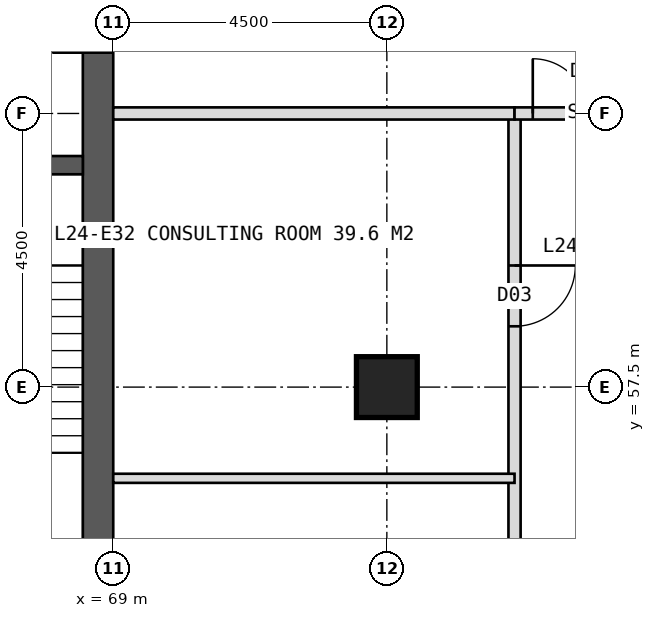
"""IFC4 building model, lengths in metres.
Left out: names, types, materials, properties, quantities, classifications, styles, units other than length and angle.
Written with IfcOpenShell. Run it as: python <this file> out.ifc"""

import sys

from ifc_helpers import new_model, si_unit, direction, frame, frame_2d, origin, origin_2d, place, context, subcontext, project, spatial, rectangle, hollow_rectangle, extrude, element, fill, save


model = new_model("IFC4")
c1 = context("Model", 3, precision=1e-05, world=origin(), true_north=direction((0.0, 1.0)))
c2 = subcontext(c1, "Body", "Model", "MODEL_VIEW")
j1 = project(units=[si_unit("LENGTHUNIT", "METRE"), si_unit("PLANEANGLEUNIT", "RADIAN")], contexts=[c1])
p1 = place(None, origin())
s1 = spatial("IfcSite", under=j1, at=p1, CompositionType="ELEMENT")
p2 = place(p1, origin())
s2 = spatial("IfcBuilding", under=s1, at=p2, CompositionType="ELEMENT")
p3 = place(p2, frame((0.0, 0.0, 104.0)))
s3 = spatial("IfcBuildingStorey", under=s2, at=p3, CompositionType="ELEMENT", Elevation=104.0)
p4 = place(p3, frame((68.75, 53.5, 0.0), z_axis=(0.0, 0.0, 1.0), x_axis=(0.0, 1.0, 0.0)))
e1 = element("IfcWall", 1, at=p4, inside=s3, PredefinedType="SHEAR", context=c2, shape_type="SweptSolid", body=[
    extrude(rectangle(XDim=17.0, YDim=0.5, at=frame_2d((8.5, 0.0))), origin(), (0.0, 0.0, 1.0), 4.0),
])
p5 = place(p4, frame((9.5, 0.0, 0.0)))
e2 = element("IfcOpeningElement", 2, at=p5, cuts=e1, PredefinedType="OPENING", context=c2, shape_type="SweptSolid", body=[
    extrude(rectangle(XDim=1.5, YDim=2.2, at=frame_2d((0.75, 1.1))), frame((0.0, 0.26, 0.0), z_axis=(0.0, -1.0, 0.0), x_axis=(1.0, 0.0, 0.0)), (0.0, 0.0, 1.0), 0.52),
])
p6 = place(p3, frame((65.2, 61.15, 0.0), z_axis=(0.0, 0.0, 1.0), x_axis=(1.0, 0.0, 0.0)))
e3 = element("IfcWall", 3, at=p6, inside=s3, PredefinedType="SHEAR", context=c2, shape_type="SweptSolid", body=[
    extrude(rectangle(XDim=3.3, YDim=0.3, at=frame_2d((1.65, 0.0))), origin(), (0.0, 0.0, 1.0), 4.0),
])
p7 = place(p6, frame((1.05, 0.0, 0.0)))
e4 = element("IfcOpeningElement", 4, at=p7, cuts=e3, PredefinedType="OPENING", context=c2, shape_type="SweptSolid", body=[
    extrude(rectangle(XDim=1.2, YDim=2.1, at=frame_2d((0.6, 1.05))), frame((0.0, 0.16, 0.0), z_axis=(0.0, -1.0, 0.0), x_axis=(1.0, 0.0, 0.0)), (0.0, 0.0, 1.0), 0.32),
])
p8 = place(p3, frame((73.5, 57.5, 0.0), z_axis=(0.0, 0.0, 1.0), x_axis=(1.0, 0.0, 0.0)))
e5 = element("IfcColumn", 5, at=p8, inside=s3, PredefinedType="COLUMN", context=c2, shape_type="SweptSolid", body=[
    extrude(hollow_rectangle(XDim=1.0, YDim=1.0, WallThickness=0.1, at=origin_2d()), origin(), (0.0, 0.0, 1.0), 4.0),
])
p9 = place(p3, frame((75.6, 62.0, 0.0), z_axis=(0.0, 0.0, 1.0), x_axis=(0.0, -1.0, 0.0)))
e6 = element("IfcWall", 6, at=p9, inside=s3, PredefinedType="PARTITIONING", context=c2, shape_type="SweptSolid", body=[
    extrude(rectangle(XDim=15.6, YDim=0.2, at=frame_2d((7.8, 0.0))), origin(), (0.0, 0.0, 1.0), 3.75),
])
p10 = place(p9, frame((2.5, 0.0, 0.0)))
e7 = element("IfcOpeningElement", 7, at=p10, cuts=e6, PredefinedType="OPENING", context=c2, shape_type="SweptSolid", body=[
    extrude(rectangle(XDim=1.0, YDim=2.1, at=frame_2d((0.5, 1.05))), frame((0.0, 0.11, 0.0), z_axis=(0.0, -1.0, 0.0), x_axis=(1.0, 0.0, 0.0)), (0.0, 0.0, 1.0), 0.22),
])
p11 = place(p9, frame((7.75, 0.0, 0.0)))
e8 = element("IfcOpeningElement", 8, at=p11, cuts=e6, PredefinedType="OPENING", context=c2, shape_type="SweptSolid", body=[
    extrude(rectangle(XDim=1.0, YDim=2.1, at=frame_2d((0.5, 1.05))), frame((0.0, 0.11, 0.0), z_axis=(0.0, -1.0, 0.0), x_axis=(1.0, 0.0, 0.0)), (0.0, 0.0, 1.0), 0.22),
])
p12 = place(p9, frame((12.55, 0.0, 0.0)))
e9 = element("IfcOpeningElement", 9, at=p12, cuts=e6, PredefinedType="OPENING", context=c2, shape_type="SweptSolid", body=[
    extrude(rectangle(XDim=1.0, YDim=2.1, at=frame_2d((0.5, 1.05))), frame((0.0, 0.11, 0.0), z_axis=(0.0, -1.0, 0.0), x_axis=(1.0, 0.0, 0.0)), (0.0, 0.0, 1.0), 0.22),
])
p13 = place(p3, frame((69.0, 62.0, 0.0), z_axis=(0.0, 0.0, 1.0), x_axis=(1.0, 0.0, 0.0)))
e10 = element("IfcWall", 10, at=p13, inside=s3, PredefinedType="SOLIDWALL", context=c2, shape_type="SweptSolid", body=[
    extrude(rectangle(XDim=6.6, YDim=0.2, at=frame_2d((3.3, 0.0))), origin(), (0.0, 0.0, 1.0), 2.95),
])
p14 = place(p3, frame((69.0, 56.0, 0.0), z_axis=(0.0, 0.0, 1.0), x_axis=(1.0, 0.0, 0.0)))
e11 = element("IfcWall", 11, at=p14, inside=s3, PredefinedType="PARTITIONING", context=c2, shape_type="SweptSolid", body=[
    extrude(rectangle(XDim=6.6, YDim=0.15, at=frame_2d((3.3, 0.0))), origin(), (0.0, 0.0, 1.0), 3.75),
])
p15 = place(p3, frame((75.6, 62.0, 0.0), z_axis=(0.0, 0.0, 1.0), x_axis=(1.0, 0.0, 0.0)))
e12 = element("IfcWall", 12, at=p15, inside=s3, PredefinedType="SOLIDWALL", context=c2, shape_type="SweptSolid", body=[
    extrude(rectangle(XDim=2.7, YDim=0.2, at=frame_2d((1.35, 0.0))), origin(), (0.0, 0.0, 1.0), 2.95),
])
p16 = place(p15, frame((0.3, 0.0, 0.0)))
e13 = element("IfcOpeningElement", 13, at=p16, cuts=e12, PredefinedType="OPENING", context=c2, shape_type="SweptSolid", body=[
    extrude(rectangle(XDim=1.8, YDim=2.2, at=frame_2d((0.9, 1.1))), frame((0.0, 0.11, 0.0), z_axis=(0.0, -1.0, 0.0), x_axis=(1.0, 0.0, 0.0)), (0.0, 0.0, 1.0), 0.22),
])
p17 = place(p10, origin())
e14 = element("IfcDoor", 14, at=p17, inside=s3, OperationType="SINGLE_SWING_LEFT", PredefinedType="DOOR", context=c2, shape_type="SweptSolid", body=[
    extrude(rectangle(XDim=1.0, YDim=2.1, at=frame_2d((0.5, 1.05))), frame((0.0, 0.025, 0.0), z_axis=(0.0, -1.0, 0.0), x_axis=(1.0, 0.0, 0.0)), (0.0, 0.0, 1.0), 0.05),
])
fill(e7, e14)
p18 = place(p16, origin())
e15 = element("IfcDoor", 15, at=p18, inside=s3, OperationType="DOUBLE_DOOR_DOUBLE_SWING", PredefinedType="DOOR", context=c2, shape_type="SweptSolid", body=[
    extrude(rectangle(XDim=1.8, YDim=2.2, at=frame_2d((0.9, 1.1))), frame((0.0, 0.025, 0.0), z_axis=(0.0, -1.0, 0.0), x_axis=(1.0, 0.0, 0.0)), (0.0, 0.0, 1.0), 0.05),
])
fill(e13, e15)
save(model, sys.argv[1])
